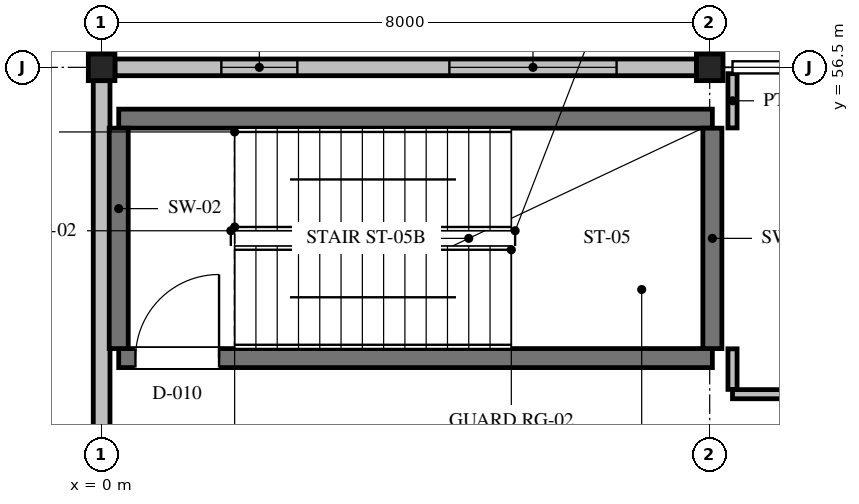
"""IFC4 building model, lengths in metres.
Left out: names, types, materials, properties, quantities, classifications, styles, units other than length and angle.
Written with IfcOpenShell. Run it as: python <this file> out.ifc"""

import sys

from ifc_helpers import new_model, si_unit, direction, frame, frame_2d, origin, origin_2d, place, context, subcontext, project, spatial, rectangle, i_section, extrude, element, fill, save


model = new_model("IFC4")
c1 = context("Model", 3, precision=1e-05, world=origin(), true_north=direction((0.0, 1.0)))
c2 = subcontext(c1, "Body", "Model", "MODEL_VIEW")
j1 = project(units=[si_unit("LENGTHUNIT", "METRE"), si_unit("PLANEANGLEUNIT", "RADIAN")], contexts=[c1])
p1 = place(None, origin())
s1 = spatial("IfcSite", under=j1, at=p1, CompositionType="ELEMENT")
p2 = place(p1, origin())
s2 = spatial("IfcBuilding", under=s1, at=p2, CompositionType="ELEMENT")
p3 = place(p2, frame((0.0, 0.0, 5.85)))
s3 = spatial("IfcBuildingStorey", under=s2, at=p3, CompositionType="ELEMENT", Elevation=5.85)
for number, where, z_axis, x_axis in (
    (1, (0.0, 56.5, 0.0), (0.0, 0.0, 1.0), (1.0, 0.0, 0.0)),
    (2, (8.0, 56.5, 0.0), (0.0, 0.0, 1.0), (1.0, 0.0, 0.0)),
):
    element("IfcColumn", number, at=place(p3, frame(where, z_axis=z_axis, x_axis=x_axis)), inside=s3, PredefinedType="COLUMN", context=c2, shape_type="SweptSolid", body=[
        extrude(i_section(OverallWidth=0.35, OverallDepth=0.35, WebThickness=0.012, FlangeThickness=0.019, FilletRadius=0.02, at=origin_2d()), origin(), (0.0, 0.0, 1.0), 4.2),
    ])
p4 = place(p3, frame((0.0, 42.675, 0.0), z_axis=(0.0, 0.0, 1.0), x_axis=(0.0, 1.0, 0.0)))
e3 = element("IfcWall", 3, at=p4, inside=s3, PredefinedType="SOLIDWALL", context=c2, shape_type="SweptSolid", body=[
    extrude(rectangle(XDim=13.65, YDim=0.22, at=frame_2d((6.825, 0.0))), origin(), (0.0, 0.0, 1.0), 3.494),
])
p5 = place(p4, frame((2.5, 0.0, 1.0)))
e4 = element("IfcOpeningElement", 4, at=p5, cuts=e3, PredefinedType="OPENING", context=c2, shape_type="SweptSolid", body=[
    extrude(rectangle(XDim=1.6, YDim=1.8, at=frame_2d((0.8, 0.9))), frame((0.0, 0.12, 0.0), z_axis=(0.0, -1.0, 0.0), x_axis=(1.0, 0.0, 0.0)), (0.0, 0.0, 1.0), 0.24),
])
p6 = place(p3, frame((0.175, 56.5, 0.0), z_axis=(0.0, 0.0, 1.0), x_axis=(1.0, 0.0, 0.0)))
e5 = element("IfcWall", 5, at=p6, inside=s3, PredefinedType="SOLIDWALL", context=c2, shape_type="SweptSolid", body=[
    extrude(rectangle(XDim=7.65, YDim=0.22, at=frame_2d((3.825, 0.0))), origin(), (0.0, 0.0, 1.0), 3.194),
])
p7 = place(p6, frame((1.4, 0.0, 0.95)))
e6 = element("IfcOpeningElement", 6, at=p7, cuts=e5, PredefinedType="OPENING", context=c2, shape_type="SweptSolid", body=[
    extrude(rectangle(XDim=1.0, YDim=1.5, at=frame_2d((0.5, 0.75))), frame((0.0, 0.12, 0.0), z_axis=(0.0, -1.0, 0.0), x_axis=(1.0, 0.0, 0.0)), (0.0, 0.0, 1.0), 0.24),
])
p8 = place(p6, frame((4.4, 0.0, 0.95)))
e7 = element("IfcOpeningElement", 7, at=p8, cuts=e5, PredefinedType="OPENING", context=c2, shape_type="SweptSolid", body=[
    extrude(rectangle(XDim=2.2, YDim=1.8, at=frame_2d((1.1, 0.9))), frame((0.0, 0.12, 0.0), z_axis=(0.0, -1.0, 0.0), x_axis=(1.0, 0.0, 0.0)), (0.0, 0.0, 1.0), 0.24),
])
p9 = place(p3, frame((0.225, 52.675, 0.0), z_axis=(0.0, 0.0, 1.0), x_axis=(1.0, 0.0, 0.0)))
e8 = element("IfcWall", 8, at=p9, inside=s3, PredefinedType="SHEAR", context=c2, shape_type="SweptSolid", body=[
    extrude(rectangle(XDim=7.81, YDim=0.25, at=frame_2d((3.905, 0.0))), origin(), (0.0, 0.0, 1.0), 4.0),
])
p10 = place(p9, frame((0.22, 0.0, 0.0)))
e9 = element("IfcOpeningElement", 9, at=p10, cuts=e8, PredefinedType="OPENING", context=c2, shape_type="SweptSolid", body=[
    extrude(rectangle(XDim=1.1, YDim=2.15, at=frame_2d((0.55, 1.075))), frame((0.0, 0.135, 0.0), z_axis=(0.0, -1.0, 0.0), x_axis=(1.0, 0.0, 0.0)), (0.0, 0.0, 1.0), 0.27),
])
p11 = place(p3, frame((0.225, 55.825, 0.0), z_axis=(0.0, 0.0, 1.0), x_axis=(1.0, 0.0, 0.0)))
e10 = element("IfcWall", 10, at=p11, inside=s3, PredefinedType="SHEAR", context=c2, shape_type="SweptSolid", body=[
    extrude(rectangle(XDim=7.81, YDim=0.25, at=frame_2d((3.905, 0.0))), origin(), (0.0, 0.0, 1.0), 4.0),
])
for number, where, z_axis, x_axis in (
    (11, (0.225, 52.8, 0.0), (0.0, 0.0, 1.0), (0.0, 1.0, 0.0)),
    (12, (8.035, 52.8, 0.0), (0.0, 0.0, 1.0), (0.0, 1.0, 0.0)),
):
    element("IfcWall", number, at=place(p3, frame(where, z_axis=z_axis, x_axis=x_axis)), inside=s3, PredefinedType="SHEAR", context=c2, shape_type="SweptSolid", body=[
        extrude(rectangle(XDim=2.9, YDim=0.25, at=frame_2d((1.45, 0.0))), origin(), (0.0, 0.0, 1.0), 4.0),
    ])
p12 = place(p3, frame((8.3, 52.2, 0.0), z_axis=(0.0, 0.0, 1.0), x_axis=(1.0, 0.0, 0.0)))
e13 = element("IfcWall", 13, at=p12, inside=s3, PredefinedType="PARTITIONING", context=c2, shape_type="SweptSolid", body=[
    extrude(rectangle(XDim=7.5, YDim=0.12, at=frame_2d((3.75, 0.0))), origin(), (0.0, 0.0, 1.0), 4.0),
])
p13 = place(p12, frame((3.225, 0.0, 0.0)))
e14 = element("IfcOpeningElement", 14, at=p13, cuts=e13, PredefinedType="OPENING", context=c2, shape_type="SweptSolid", body=[
    extrude(rectangle(XDim=1.05, YDim=2.1, at=frame_2d((0.525, 1.05))), frame((0.0, 0.07, 0.0), z_axis=(0.0, -1.0, 0.0), x_axis=(1.0, 0.0, 0.0)), (0.0, 0.0, 1.0), 0.14),
])
p14 = place(p3, frame((8.3, 52.263, 0.0), z_axis=(0.0, 0.0, 1.0), x_axis=(0.0, 1.0, 0.0)))
e15 = element("IfcWall", 15, at=p14, inside=s3, PredefinedType="PARTITIONING", context=c2, shape_type="SweptSolid", body=[
    extrude(rectangle(XDim=0.534, YDim=0.12, at=frame_2d((0.267, 0.0))), origin(), (0.0, 0.0, 1.0), 4.0),
])
p15 = place(p3, frame((8.3, 55.703, 0.0), z_axis=(0.0, 0.0, 1.0), x_axis=(0.0, 1.0, 0.0)))
e16 = element("IfcWall", 16, at=p15, inside=s3, PredefinedType="PARTITIONING", context=c2, shape_type="SweptSolid", body=[
    extrude(rectangle(XDim=0.714, YDim=0.12, at=frame_2d((0.357, 0.0))), origin(), (0.0, 0.0, 1.0), 4.0),
])
p16 = place(p7, origin())
e17 = element("IfcWindow", 17, at=p16, inside=s3, PartitioningType="SINGLE_PANEL", PredefinedType="WINDOW", context=c2, shape_type="SweptSolid", body=[
    extrude(rectangle(XDim=1.0, YDim=1.5, at=frame_2d((0.5, 0.75))), frame((0.0, 0.03, 0.0), z_axis=(0.0, -1.0, 0.0), x_axis=(1.0, 0.0, 0.0)), (0.0, 0.0, 1.0), 0.06),
])
fill(e6, e17)
p17 = place(p8, origin())
e18 = element("IfcWindow", 18, at=p17, inside=s3, PartitioningType="SINGLE_PANEL", PredefinedType="WINDOW", context=c2, shape_type="SweptSolid", body=[
    extrude(rectangle(XDim=2.2, YDim=1.8, at=frame_2d((1.1, 0.9))), frame((0.0, 0.03, 0.0), z_axis=(0.0, -1.0, 0.0), x_axis=(1.0, 0.0, 0.0)), (0.0, 0.0, 1.0), 0.06),
])
fill(e7, e18)
p18 = place(p10, frame((1.1, 0.0, 0.0), z_axis=(0.0, 0.0, 1.0), x_axis=(-1.0, 0.0, 0.0)))
e19 = element("IfcDoor", 19, at=p18, inside=s3, OperationType="SINGLE_SWING_RIGHT", PredefinedType="DOOR", context=c2, shape_type="SweptSolid", body=[
    extrude(rectangle(XDim=1.1, YDim=2.15, at=frame_2d((0.55, 1.075))), frame((0.0, 0.025, 0.0), z_axis=(0.0, -1.0, 0.0), x_axis=(1.0, 0.0, 0.0)), (0.0, 0.0, 1.0), 0.05),
])
fill(e9, e19)
save(model, sys.argv[1])
